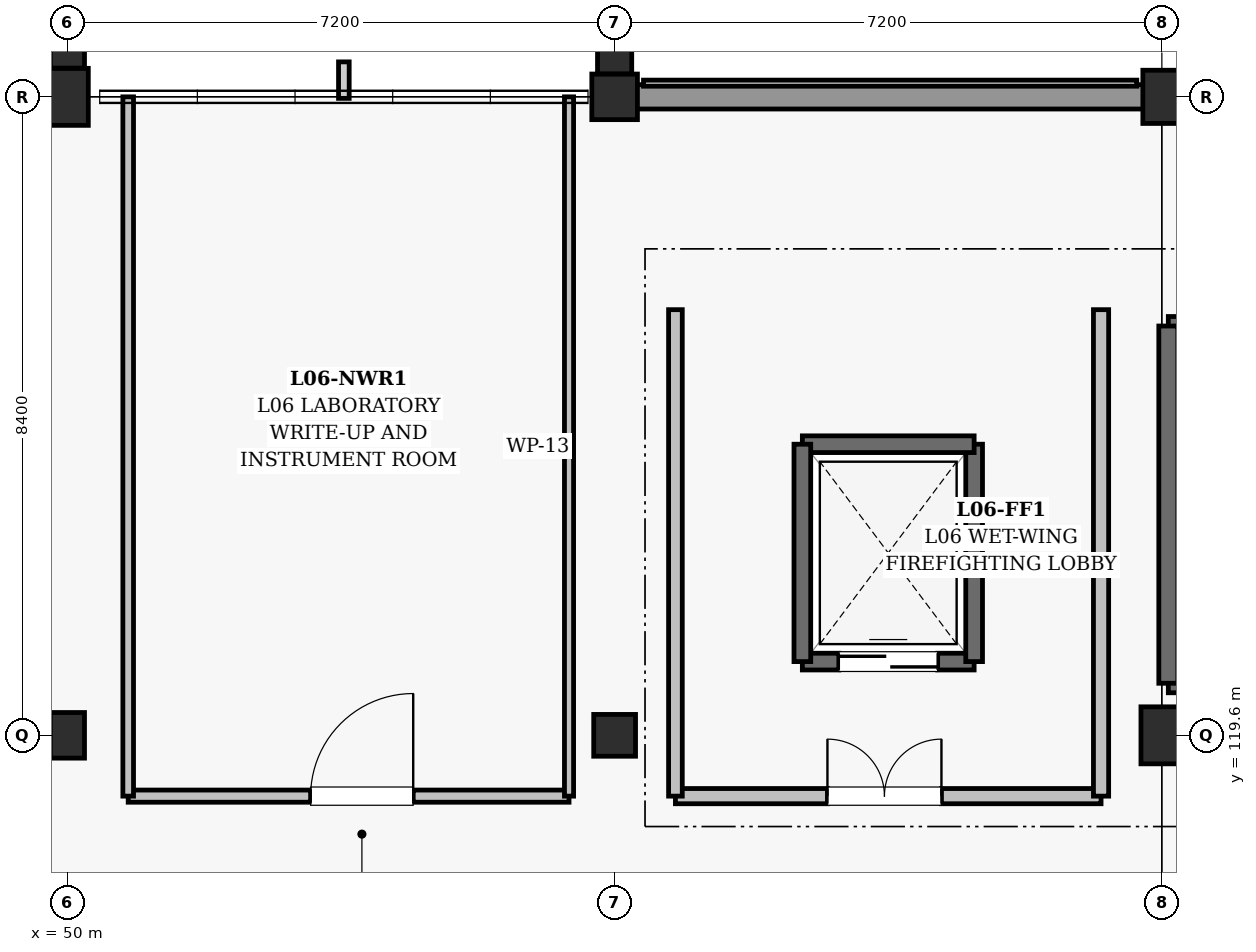
"""IFC4 building model, lengths in metres.
Left out: names, types, materials, properties, quantities, classifications, styles, units other than length and angle.
Written with IfcOpenShell. Run it as: python <this file> out.ifc"""

import sys

from ifc_helpers import new_model, si_unit, direction, frame, frame_2d, origin, origin_2d, place, context, subcontext, project, spatial, rectangle, extrude, element, fill, save


model = new_model("IFC4")
c1 = context("Model", 3, precision=1e-05, world=origin(), true_north=direction((0.0, 1.0)))
c2 = subcontext(c1, "Body", "Model", "MODEL_VIEW")
j1 = project(units=[si_unit("LENGTHUNIT", "METRE"), si_unit("PLANEANGLEUNIT", "RADIAN")], contexts=[c1])
p1 = place(None, origin())
s1 = spatial("IfcSite", under=j1, at=p1, CompositionType="ELEMENT")
p2 = place(p1, origin())
s2 = spatial("IfcBuilding", under=s1, at=p2, CompositionType="ELEMENT")
p3 = place(p2, frame((0.0, 0.0, 27.9)))
s3 = spatial("IfcBuildingStorey", under=s2, at=p3, CompositionType="ELEMENT", Elevation=27.9)
p4 = place(p3, frame((50.0, 119.6, 0.0), z_axis=(0.0, 0.0, 1.0), x_axis=(1.0, 0.0, 0.0)))
e1 = element("IfcColumn", 1, at=p4, inside=s3, PredefinedType="COLUMN", context=c2, shape_type="SweptSolid", body=[
    extrude(rectangle(XDim=0.45, YDim=0.6, at=origin_2d()), origin(), (0.0, 0.0, 1.0), 4.5),
])
p5 = place(p3, frame((50.0, 128.0, 0.0), z_axis=(0.0, 0.0, 1.0), x_axis=(1.0, 0.0, 0.0)))
e2 = element("IfcColumn", 2, at=p5, inside=s3, PredefinedType="COLUMN", context=c2, shape_type="SweptSolid", body=[
    extrude(rectangle(XDim=0.55, YDim=0.75, at=origin_2d()), origin(), (0.0, 0.0, 1.0), 4.5),
])
p6 = place(p3, frame((57.2, 119.6, 0.0), z_axis=(0.0, 0.0, 1.0), x_axis=(1.0, 0.0, 0.0)))
e3 = element("IfcColumn", 3, at=p6, inside=s3, PredefinedType="COLUMN", context=c2, shape_type="SweptSolid", body=[
    extrude(rectangle(XDim=0.55, YDim=0.55, at=origin_2d()), origin(), (0.0, 0.0, 1.0), 4.5),
])
p7 = place(p3, frame((57.2, 128.0, 0.0), z_axis=(0.0, 0.0, 1.0), x_axis=(1.0, 0.0, 0.0)))
e4 = element("IfcColumn", 4, at=p7, inside=s3, PredefinedType="COLUMN", context=c2, shape_type="SweptSolid", body=[
    extrude(rectangle(XDim=0.6, YDim=0.6, at=origin_2d()), origin(), (0.0, 0.0, 1.0), 4.5),
])
p8 = place(p3, frame((64.4, 119.6, 0.0), z_axis=(0.0, 0.0, 1.0), x_axis=(1.0, 0.0, 0.0)))
e5 = element("IfcColumn", 5, at=p8, inside=s3, PredefinedType="COLUMN", context=c2, shape_type="SweptSolid", body=[
    extrude(rectangle(XDim=0.55, YDim=0.75, at=origin_2d()), origin(), (0.0, 0.0, 1.0), 4.5),
])
p9 = place(p3, frame((64.4, 128.0, 0.0), z_axis=(0.0, 0.0, 1.0), x_axis=(1.0, 0.0, 0.0)))
e6 = element("IfcColumn", 6, at=p9, inside=s3, PredefinedType="COLUMN", context=c2, shape_type="SweptSolid", body=[
    extrude(rectangle(XDim=0.5, YDim=0.7, at=origin_2d()), origin(), (0.0, 0.0, 1.0), 4.5),
])
for number, where, z_axis, x_axis in (
    (7, (50.0, 128.703, 0.0), (0.0, 0.0, 1.0), (1.0, 0.0, 0.0)),
    (8, (57.2, 128.628, 0.0), (0.0, 0.0, 1.0), (1.0, 0.0, 0.0)),
):
    element("IfcColumn", number, at=place(p3, frame(where, z_axis=z_axis, x_axis=x_axis)), inside=s3, PredefinedType="PILASTER", context=c2, shape_type="SweptSolid", body=[
        extrude(rectangle(XDim=0.45, YDim=0.65, at=origin_2d()), origin(), (0.0, 0.0, 1.0), 4.5),
    ])
p10 = place(p3, frame((57.48, 128.0, 0.0), z_axis=(0.0, 0.0, 1.0), x_axis=(1.0, 0.0, 0.0)))
e9 = element("IfcWall", 9, at=p10, inside=s3, PredefinedType="SOLIDWALL", context=c2, shape_type="SweptSolid", body=[
    extrude(rectangle(XDim=6.69, YDim=0.32, at=frame_2d((3.345, 0.0))), origin(), (0.0, 0.0, 1.0), 3.305),
])
p11 = place(p3, frame((64.485, 120.285, 0.0), z_axis=(0.0, 0.0, 1.0), x_axis=(1.0, 0.0, 0.0)))
e10 = element("IfcWall", 10, at=p11, inside=s3, PredefinedType="SHEAR", context=c2, shape_type="SweptSolid", body=[
    extrude(rectangle(XDim=10.63, YDim=0.25, at=frame_2d((5.315, 0.0))), origin(), (0.0, 0.0, 1.0), 4.175),
])
p12 = place(p11, frame((0.55, 0.0, 0.0)))
e11 = element("IfcOpeningElement", 11, at=p12, cuts=e10, PredefinedType="OPENING", context=c2, shape_type="SweptSolid", body=[
    extrude(rectangle(XDim=1.2, YDim=2.15, at=frame_2d((0.6, 1.075))), frame((0.0, 0.135, 0.0), z_axis=(0.0, -1.0, 0.0), x_axis=(1.0, 0.0, 0.0)), (0.0, 0.0, 1.0), 0.27),
])
p13 = place(p3, frame((75.115, 124.985, 0.0), z_axis=(0.0, 0.0, 1.0), x_axis=(-1.0, 0.0, 0.0)))
e12 = element("IfcWall", 12, at=p13, inside=s3, PredefinedType="SHEAR", context=c2, shape_type="SweptSolid", body=[
    extrude(rectangle(XDim=10.63, YDim=0.25, at=frame_2d((5.315, 0.0))), origin(), (0.0, 0.0, 1.0), 4.175),
])
p14 = place(p3, frame((64.485, 124.985, 0.0), z_axis=(0.0, 0.0, 1.0), x_axis=(0.0, -1.0, 0.0)))
e13 = element("IfcWall", 13, at=p14, inside=s3, PredefinedType="SHEAR", context=c2, shape_type="SweptSolid", body=[
    extrude(rectangle(XDim=4.7, YDim=0.25, at=frame_2d((2.35, 0.0))), origin(), (0.0, 0.0, 1.0), 4.175),
])
p15 = place(p3, frame((59.67, 120.57, 0.0), z_axis=(0.0, 0.0, 1.0), x_axis=(1.0, 0.0, 0.0)))
e14 = element("IfcWall", 14, at=p15, inside=s3, PredefinedType="SHEAR", context=c2, shape_type="SweptSolid", body=[
    extrude(rectangle(XDim=2.26, YDim=0.22, at=frame_2d((1.13, 0.0))), origin(), (0.0, 0.0, 1.0), 4.175),
])
p16 = place(p15, frame((0.48, 0.0, 0.0)))
e15 = element("IfcOpeningElement", 15, at=p16, cuts=e14, PredefinedType="OPENING", context=c2, shape_type="SweptSolid", body=[
    extrude(rectangle(XDim=1.3, YDim=2.2, at=frame_2d((0.65, 1.1))), frame((0.0, 0.12, 0.0), z_axis=(0.0, -1.0, 0.0), x_axis=(1.0, 0.0, 0.0)), (0.0, 0.0, 1.0), 0.24),
])
p17 = place(p3, frame((61.93, 120.57, 0.0), z_axis=(0.0, 0.0, 1.0), x_axis=(0.0, 1.0, 0.0)))
e16 = element("IfcWall", 16, at=p17, inside=s3, PredefinedType="SHEAR", context=c2, shape_type="SweptSolid", body=[
    extrude(rectangle(XDim=2.86, YDim=0.22, at=frame_2d((1.43, 0.0))), origin(), (0.0, 0.0, 1.0), 4.175),
])
p18 = place(p3, frame((61.93, 123.43, 0.0), z_axis=(0.0, 0.0, 1.0), x_axis=(-1.0, 0.0, 0.0)))
e17 = element("IfcWall", 17, at=p18, inside=s3, PredefinedType="SHEAR", context=c2, shape_type="SweptSolid", body=[
    extrude(rectangle(XDim=2.26, YDim=0.22, at=frame_2d((1.13, 0.0))), origin(), (0.0, 0.0, 1.0), 4.175),
])
p19 = place(p3, frame((59.67, 123.43, 0.0), z_axis=(0.0, 0.0, 1.0), x_axis=(0.0, -1.0, 0.0)))
e18 = element("IfcWall", 18, at=p19, inside=s3, PredefinedType="SHEAR", context=c2, shape_type="SweptSolid", body=[
    extrude(rectangle(XDim=2.86, YDim=0.22, at=frame_2d((1.43, 0.0))), origin(), (0.0, 0.0, 1.0), 4.175),
])
p20 = place(p3, frame((58.0, 118.8, 0.0), z_axis=(0.0, 0.0, 1.0), x_axis=(1.0, 0.0, 0.0)))
e19 = element("IfcWall", 19, at=p20, inside=s3, PredefinedType="SOLIDWALL", context=c2, shape_type="SweptSolid", body=[
    extrude(rectangle(XDim=5.6, YDim=0.2, at=frame_2d((2.8, 0.0))), origin(), (0.0, 0.0, 1.0), 3.54),
])
p21 = place(p20, frame((2.0, 0.0, 0.0)))
e20 = element("IfcOpeningElement", 20, at=p21, cuts=e19, PredefinedType="OPENING", context=c2, shape_type="SweptSolid", body=[
    extrude(rectangle(XDim=1.5, YDim=2.2, at=frame_2d((0.75, 1.1))), frame((0.0, 0.11, 0.0), z_axis=(0.0, -1.0, 0.0), x_axis=(1.0, 0.0, 0.0)), (0.0, 0.0, 1.0), 0.22),
])
p22 = place(p3, frame((58.0, 118.8, 0.0), z_axis=(0.0, 0.0, 1.0), x_axis=(0.0, 1.0, 0.0)))
e21 = element("IfcWall", 21, at=p22, inside=s3, PredefinedType="SOLIDWALL", context=c2, shape_type="SweptSolid", body=[
    extrude(rectangle(XDim=6.4, YDim=0.18, at=frame_2d((3.2, 0.0))), origin(), (0.0, 0.0, 1.0), 3.36),
])
p23 = place(p3, frame((63.6, 118.8, 0.0), z_axis=(0.0, 0.0, 1.0), x_axis=(0.0, 1.0, 0.0)))
e22 = element("IfcWall", 22, at=p23, inside=s3, PredefinedType="SOLIDWALL", context=c2, shape_type="SweptSolid", body=[
    extrude(rectangle(XDim=6.4, YDim=0.2, at=frame_2d((3.2, 0.0))), origin(), (0.0, 0.0, 1.0), 3.36),
])
p24 = place(p3, frame((50.8, 118.8, 0.0), z_axis=(0.0, 0.0, 1.0), x_axis=(1.0, 0.0, 0.0)))
e23 = element("IfcWall", 23, at=p24, inside=s3, PredefinedType="PARTITIONING", context=c2, shape_type="SweptSolid", body=[
    extrude(rectangle(XDim=5.8, YDim=0.16, at=frame_2d((2.9, 0.0))), origin(), (0.0, 0.0, 1.0), 3.54),
])
p25 = place(p24, frame((2.4, 0.0, 0.0)))
e24 = element("IfcOpeningElement", 24, at=p25, cuts=e23, PredefinedType="OPENING", context=c2, shape_type="SweptSolid", body=[
    extrude(rectangle(XDim=1.35, YDim=2.2, at=frame_2d((0.675, 1.1))), frame((0.0, 0.09, 0.0), z_axis=(0.0, -1.0, 0.0), x_axis=(1.0, 0.0, 0.0)), (0.0, 0.0, 1.0), 0.18),
])
p26 = place(p3, frame((50.8, 118.8, 0.0), z_axis=(0.0, 0.0, 1.0), x_axis=(0.0, 1.0, 0.0)))
e25 = element("IfcWall", 25, at=p26, inside=s3, PredefinedType="PARTITIONING", context=c2, shape_type="SweptSolid", body=[
    extrude(rectangle(XDim=9.2, YDim=0.14, at=frame_2d((4.6, 0.0))), origin(), (0.0, 0.0, 1.0), 3.41),
])
p27 = place(p3, frame((56.6, 118.8, 0.0), z_axis=(0.0, 0.0, 1.0), x_axis=(0.0, 1.0, 0.0)))
e26 = element("IfcWall", 26, at=p27, inside=s3, PredefinedType="PARTITIONING", context=c2, shape_type="SweptSolid", body=[
    extrude(rectangle(XDim=9.2, YDim=0.12, at=frame_2d((4.6, 0.0))), origin(), (0.0, 0.0, 1.0), 3.41),
])
p28 = place(p16, origin())
e27 = element("IfcDoor", 27, at=p28, inside=s3, OperationType="DOUBLE_DOOR_SLIDING", PredefinedType="DOOR", context=c2, shape_type="SweptSolid", body=[
    extrude(rectangle(XDim=1.3, YDim=2.2, at=frame_2d((0.65, 1.1))), frame((0.0, 0.025, 0.0), z_axis=(0.0, -1.0, 0.0), x_axis=(1.0, 0.0, 0.0)), (0.0, 0.0, 1.0), 0.05),
])
fill(e15, e27)
p29 = place(p21, origin())
e28 = element("IfcDoor", 28, at=p29, inside=s3, OperationType="DOUBLE_DOOR_SINGLE_SWING", PredefinedType="DOOR", context=c2, shape_type="SweptSolid", body=[
    extrude(rectangle(XDim=1.5, YDim=2.2, at=frame_2d((0.75, 1.1))), frame((0.0, 0.025, 0.0), z_axis=(0.0, -1.0, 0.0), x_axis=(1.0, 0.0, 0.0)), (0.0, 0.0, 1.0), 0.05),
])
fill(e20, e28)
p30 = place(p25, origin())
e29 = element("IfcDoor", 29, at=p30, inside=s3, OperationType="SINGLE_SWING_RIGHT", PredefinedType="DOOR", context=c2, shape_type="SweptSolid", body=[
    extrude(rectangle(XDim=1.35, YDim=2.2, at=frame_2d((0.675, 1.1))), frame((0.0, 0.025, 0.0), z_axis=(0.0, -1.0, 0.0), x_axis=(1.0, 0.0, 0.0)), (0.0, 0.0, 1.0), 0.05),
])
fill(e24, e29)
save(model, sys.argv[1])
